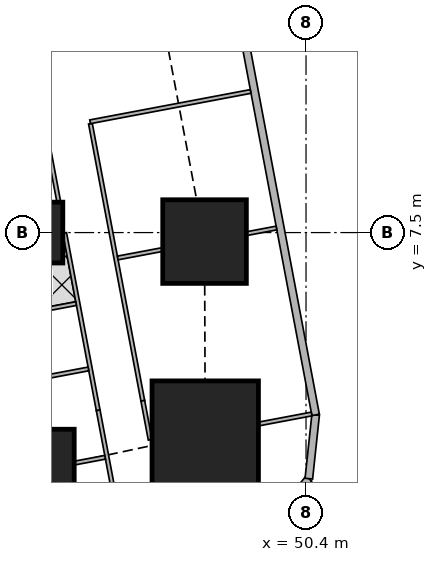
"""IFC4 building model, lengths in metres.
Left out: names, types, materials, properties, quantities, classifications, styles, units other than length and angle.
Written with IfcOpenShell. Run it as: python <this file> out.ifc"""

import sys

from ifc_helpers import new_model, si_unit, direction, frame, frame_2d, origin, origin_2d, place, context, subcontext, project, spatial, rectangle, extrude, element, fill, save


model = new_model("IFC4")
c1 = context("Model", 3, precision=1e-05, world=origin(), true_north=direction((0.0, 1.0)))
c2 = subcontext(c1, "Body", "Model", "MODEL_VIEW")
j1 = project(units=[si_unit("LENGTHUNIT", "METRE"), si_unit("PLANEANGLEUNIT", "RADIAN")], contexts=[c1])
p1 = place(None, origin())
s1 = spatial("IfcSite", under=j1, at=p1, CompositionType="ELEMENT")
p2 = place(p1, origin())
s2 = spatial("IfcBuilding", under=s1, at=p2, CompositionType="ELEMENT")
p3 = place(p2, frame((0.0, 0.0, 89.15)))
s3 = spatial("IfcBuildingStorey", under=s2, at=p3, CompositionType="ELEMENT", Elevation=89.15)
p4 = place(p3, frame((43.2, 1.225, 0.0), z_axis=(0.0, 0.0, 1.0), x_axis=(1.0, 0.0, 0.0)))
e1 = element("IfcColumn", 1, at=p4, inside=s3, PredefinedType="COLUMN", context=c2, shape_type="SweptSolid", body=[
    extrude(rectangle(XDim=2.2, YDim=2.2, at=origin_2d()), origin(), (0.0, 0.0, 1.0), 3.75),
])
p5 = place(p3, frame((47.748, 2.197, 0.0), z_axis=(0.0, 0.0, 1.0), x_axis=(1.0, 0.0, 0.0)))
e2 = element("IfcColumn", 2, at=p5, inside=s3, PredefinedType="COLUMN", context=c2, shape_type="SweptSolid", body=[
    extrude(rectangle(XDim=2.8, YDim=2.8, at=origin_2d()), origin(), (0.0, 0.0, 1.0), 3.75),
])
p6 = place(p3, frame((43.2, 7.5, 0.0), z_axis=(0.0, 0.0, 1.0), x_axis=(1.0, 0.0, 0.0)))
e3 = element("IfcColumn", 3, at=p6, inside=s3, PredefinedType="COLUMN", context=c2, shape_type="SweptSolid", body=[
    extrude(rectangle(XDim=1.6, YDim=1.6, at=origin_2d()), origin(), (0.0, 0.0, 1.0), 3.75),
])
p7 = place(p3, frame((47.73, 7.263, 0.0), z_axis=(0.0, 0.0, 1.0), x_axis=(1.0, 0.0, 0.0)))
e4 = element("IfcColumn", 4, at=p7, inside=s3, PredefinedType="COLUMN", context=c2, shape_type="SweptSolid", body=[
    extrude(rectangle(XDim=2.2, YDim=2.2, at=origin_2d()), origin(), (0.0, 0.0, 1.0), 3.75),
])
p8 = place(p3, frame((49.407, -0.263, 0.0), z_axis=(0.0, 0.0, 1.0), x_axis=(0.638042593423, 0.770001070764, 0.0)))
e5 = element("IfcWall", 5, at=p8, inside=s3, PredefinedType="SOLIDWALL", context=c2, shape_type="SweptSolid", body=[
    extrude(rectangle(XDim=1.673, YDim=0.2, at=frame_2d((0.836, 0.0))), origin(), (0.0, 0.0, 1.0), 3.5),
])
p9 = place(p3, frame((50.474, 1.025, 0.0), z_axis=(0.0, 0.0, 1.0), x_axis=(0.106047815515, 0.994361031429, 0.0)))
e6 = element("IfcWall", 6, at=p9, inside=s3, PredefinedType="SOLIDWALL", context=c2, shape_type="SweptSolid", body=[
    extrude(rectangle(XDim=1.688, YDim=0.2, at=frame_2d((0.844, 0.0))), origin(), (0.0, 0.0, 1.0), 3.5),
])
p10 = place(p3, frame((50.653, 2.703, 0.0), z_axis=(0.0, 0.0, 1.0), x_axis=(-0.185612026696, 0.982623109613, 0.0)))
e7 = element("IfcWall", 7, at=p10, inside=s3, PredefinedType="SOLIDWALL", context=c2, shape_type="SweptSolid", body=[
    extrude(rectangle(XDim=41.393, YDim=0.2, at=frame_2d((20.697, 0.0))), origin(), (0.0, 0.0, 1.0), 3.5),
])
p11 = place(p10, frame((1.633, 0.0, 0.9)))
e8 = element("IfcOpeningElement", 8, at=p11, cuts=e7, PredefinedType="OPENING", context=c2, shape_type="SweptSolid", body=[
    extrude(rectangle(XDim=1.8, YDim=1.5, at=frame_2d((0.9, 0.75))), frame((0.0, 0.11, 0.0), z_axis=(0.0, -1.0, 0.0), x_axis=(1.0, 0.0, 0.0)), (0.0, 0.0, 1.0), 0.22),
])
p12 = place(p10, frame((6.032, 0.0, 0.9)))
e9 = element("IfcOpeningElement", 9, at=p12, cuts=e7, PredefinedType="OPENING", context=c2, shape_type="SweptSolid", body=[
    extrude(rectangle(XDim=1.8, YDim=1.5, at=frame_2d((0.9, 0.75))), frame((0.0, 0.11, 0.0), z_axis=(0.0, -1.0, 0.0), x_axis=(1.0, 0.0, 0.0)), (0.0, 0.0, 1.0), 0.22),
])
p13 = place(p10, frame((9.848, 0.0, 0.9)))
e10 = element("IfcOpeningElement", 10, at=p13, cuts=e7, PredefinedType="OPENING", context=c2, shape_type="SweptSolid", body=[
    extrude(rectangle(XDim=1.8, YDim=1.5, at=frame_2d((0.9, 0.75))), frame((0.0, 0.11, 0.0), z_axis=(0.0, -1.0, 0.0), x_axis=(1.0, 0.0, 0.0)), (0.0, 0.0, 1.0), 0.22),
])
p14 = place(p10, frame((13.664, 0.0, 0.9)))
e11 = element("IfcOpeningElement", 11, at=p14, cuts=e7, PredefinedType="OPENING", context=c2, shape_type="SweptSolid", body=[
    extrude(rectangle(XDim=1.8, YDim=1.5, at=frame_2d((0.9, 0.75))), frame((0.0, 0.11, 0.0), z_axis=(0.0, -1.0, 0.0), x_axis=(1.0, 0.0, 0.0)), (0.0, 0.0, 1.0), 0.22),
])
p15 = place(p10, frame((17.481, 0.0, 0.9)))
e12 = element("IfcOpeningElement", 12, at=p15, cuts=e7, PredefinedType="OPENING", context=c2, shape_type="SweptSolid", body=[
    extrude(rectangle(XDim=1.8, YDim=1.5, at=frame_2d((0.9, 0.75))), frame((0.0, 0.11, 0.0), z_axis=(0.0, -1.0, 0.0), x_axis=(1.0, 0.0, 0.0)), (0.0, 0.0, 1.0), 0.22),
])
p16 = place(p10, frame((21.297, 0.0, 0.9)))
e13 = element("IfcOpeningElement", 13, at=p16, cuts=e7, PredefinedType="OPENING", context=c2, shape_type="SweptSolid", body=[
    extrude(rectangle(XDim=1.8, YDim=1.5, at=frame_2d((0.9, 0.75))), frame((0.0, 0.11, 0.0), z_axis=(0.0, -1.0, 0.0), x_axis=(1.0, 0.0, 0.0)), (0.0, 0.0, 1.0), 0.22),
])
p17 = place(p10, frame((25.113, 0.0, 0.9)))
e14 = element("IfcOpeningElement", 14, at=p17, cuts=e7, PredefinedType="OPENING", context=c2, shape_type="SweptSolid", body=[
    extrude(rectangle(XDim=1.8, YDim=1.5, at=frame_2d((0.9, 0.75))), frame((0.0, 0.11, 0.0), z_axis=(0.0, -1.0, 0.0), x_axis=(1.0, 0.0, 0.0)), (0.0, 0.0, 1.0), 0.22),
])
p18 = place(p10, frame((28.93, 0.0, 0.9)))
e15 = element("IfcOpeningElement", 15, at=p18, cuts=e7, PredefinedType="OPENING", context=c2, shape_type="SweptSolid", body=[
    extrude(rectangle(XDim=1.8, YDim=1.5, at=frame_2d((0.9, 0.75))), frame((0.0, 0.11, 0.0), z_axis=(0.0, -1.0, 0.0), x_axis=(1.0, 0.0, 0.0)), (0.0, 0.0, 1.0), 0.22),
])
p19 = place(p10, frame((32.746, 0.0, 0.9)))
e16 = element("IfcOpeningElement", 16, at=p19, cuts=e7, PredefinedType="OPENING", context=c2, shape_type="SweptSolid", body=[
    extrude(rectangle(XDim=1.8, YDim=1.5, at=frame_2d((0.9, 0.75))), frame((0.0, 0.11, 0.0), z_axis=(0.0, -1.0, 0.0), x_axis=(1.0, 0.0, 0.0)), (0.0, 0.0, 1.0), 0.22),
])
p20 = place(p10, frame((36.481, 0.0, 0.9)))
e17 = element("IfcOpeningElement", 17, at=p20, cuts=e7, PredefinedType="OPENING", context=c2, shape_type="SweptSolid", body=[
    extrude(rectangle(XDim=1.8, YDim=1.5, at=frame_2d((0.9, 0.75))), frame((0.0, 0.11, 0.0), z_axis=(0.0, -1.0, 0.0), x_axis=(1.0, 0.0, 0.0)), (0.0, 0.0, 1.0), 0.22),
])
p21 = place(p3, frame((44.727, 10.366, 0.0), z_axis=(0.0, 0.0, 1.0), x_axis=(0.185678775129, -0.982610498858, 0.0)))
e18 = element("IfcWall", 18, at=p21, inside=s3, PredefinedType="PARTITIONING", context=c2, shape_type="SweptSolid", body=[
    extrude(rectangle(XDim=7.421, YDim=0.1, at=frame_2d((3.71, 0.0))), origin(), (0.0, 0.0, 1.0), 3.5),
])
p22 = place(p21, frame((0.151, 0.0, 0.0)))
e19 = element("IfcOpeningElement", 19, at=p22, cuts=e18, PredefinedType="OPENING", context=c2, shape_type="SweptSolid", body=[
    extrude(rectangle(XDim=0.9, YDim=2.1, at=frame_2d((0.45, 1.05))), frame((0.0, 0.06, 0.0), z_axis=(0.0, -1.0, 0.0), x_axis=(1.0, 0.0, 0.0)), (0.0, 0.0, 1.0), 0.12),
])
p23 = place(p21, frame((4.55, 0.0, 0.0)))
e20 = element("IfcOpeningElement", 20, at=p23, cuts=e18, PredefinedType="OPENING", context=c2, shape_type="SweptSolid", body=[
    extrude(rectangle(XDim=0.9, YDim=2.1, at=frame_2d((0.45, 1.05))), frame((0.0, 0.06, 0.0), z_axis=(0.0, -1.0, 0.0), x_axis=(1.0, 0.0, 0.0)), (0.0, 0.0, 1.0), 0.12),
])
p24 = place(p3, frame((46.105, 3.074, 0.0), z_axis=(0.0, 0.0, 1.0), x_axis=(0.185897769544, -0.982569091351, 0.0)))
e21 = element("IfcWall", 21, at=p24, inside=s3, PredefinedType="PARTITIONING", context=c2, shape_type="SweptSolid", body=[
    extrude(rectangle(XDim=1.044, YDim=0.1, at=frame_2d((0.522, 0.0))), origin(), (0.0, 0.0, 1.0), 2.05),
])
p25 = place(p3, frame((43.539, 10.192, 0.0), z_axis=(0.0, 0.0, 1.0), x_axis=(0.185366049966, -0.982669541362, 0.0)))
e22 = element("IfcWall", 22, at=p25, inside=s3, PredefinedType="PARTITIONING", context=c2, shape_type="SweptSolid", body=[
    extrude(rectangle(XDim=1.915, YDim=0.1, at=frame_2d((0.958, 0.0))), origin(), (0.0, 0.0, 1.0), 3.5),
])
p26 = place(p3, frame((44.049, 7.49, 0.0), z_axis=(0.0, 0.0, 1.0), x_axis=(0.185666332607, -0.982612849975, 0.0)))
e23 = element("IfcWall", 23, at=p26, inside=s3, PredefinedType="PARTITIONING", context=c2, shape_type="SweptSolid", body=[
    extrude(rectangle(XDim=4.75, YDim=0.1, at=frame_2d((2.375, 0.0))), origin(), (0.0, 0.0, 1.0), 3.5),
])
p27 = place(p26, frame((0.8, 0.0, 0.0)))
e24 = element("IfcOpeningElement", 24, at=p27, cuts=e23, PredefinedType="OPENING", context=c2, shape_type="SweptSolid", body=[
    extrude(rectangle(XDim=0.9, YDim=2.1, at=frame_2d((0.45, 1.05))), frame((0.0, 0.06, 0.0), z_axis=(0.0, -1.0, 0.0), x_axis=(1.0, 0.0, 0.0)), (0.0, 0.0, 1.0), 0.12),
])
p28 = place(p26, frame((2.315, 0.0, 0.0)))
e25 = element("IfcOpeningElement", 25, at=p28, cuts=e23, PredefinedType="OPENING", context=c2, shape_type="SweptSolid", body=[
    extrude(rectangle(XDim=0.9, YDim=2.1, at=frame_2d((0.45, 1.05))), frame((0.0, 0.06, 0.0), z_axis=(0.0, -1.0, 0.0), x_axis=(1.0, 0.0, 0.0)), (0.0, 0.0, 1.0), 0.12),
])
p29 = place(p3, frame((44.931, 2.823, 0.0), z_axis=(0.0, 0.0, 1.0), x_axis=(0.185631845838, -0.982619365681, 0.0)))
e26 = element("IfcWall", 26, at=p29, inside=s3, PredefinedType="PARTITIONING", context=c2, shape_type="SweptSolid", body=[
    extrude(rectangle(XDim=2.403, YDim=0.1, at=frame_2d((1.201, 0.0))), origin(), (0.0, 0.0, 1.0), 2.05),
])
p30 = place(p3, frame((48.943, 11.213, 0.0), z_axis=(0.0, 0.0, 1.0), x_axis=(-0.982633535512, -0.185556823879, 0.0)))
e27 = element("IfcWall", 27, at=p30, inside=s3, PredefinedType="PARTITIONING", context=c2, shape_type="SweptSolid", body=[
    extrude(rectangle(XDim=4.3, YDim=0.1, at=frame_2d((2.15, 0.0))), origin(), (0.0, 0.0, 1.0), 2.2),
])
p31 = place(p3, frame((49.622, 7.62, 0.0), z_axis=(0.0, 0.0, 1.0), x_axis=(-0.982512656401, -0.186195810938, 0.0)))
e28 = element("IfcWall", 28, at=p31, inside=s3, PredefinedType="PARTITIONING", context=c2, shape_type="SweptSolid", body=[
    extrude(rectangle(XDim=0.796, YDim=0.1, at=frame_2d((0.398, 0.0))), origin(), (0.0, 0.0, 1.0), 2.05),
])
p32 = place(p3, frame((46.62, 7.053, 0.0), z_axis=(0.0, 0.0, 1.0), x_axis=(-0.982749355621, -0.18494243436, 0.0)))
e29 = element("IfcWall", 29, at=p32, inside=s3, PredefinedType="PARTITIONING", context=c2, shape_type="SweptSolid", body=[
    extrude(rectangle(XDim=1.195, YDim=0.1, at=frame_2d((0.597, 0.0))), origin(), (0.0, 0.0, 1.0), 2.05),
])
p33 = place(p3, frame((50.547, 2.726, 0.0), z_axis=(0.0, 0.0, 1.0), x_axis=(-0.982680053146, -0.185310315822, 0.0)))
e30 = element("IfcWall", 30, at=p33, inside=s3, PredefinedType="PARTITIONING", context=c2, shape_type="SweptSolid", body=[
    extrude(rectangle(XDim=1.414, YDim=0.1, at=frame_2d((0.707, 0.0))), origin(), (0.0, 0.0, 1.0), 3.5),
])
p34 = place(p3, frame((45.114, 1.587, 0.0), z_axis=(0.0, 0.0, 1.0), x_axis=(-0.982624706348, -0.185603573443, 0.0)))
e31 = element("IfcWall", 31, at=p34, inside=s3, PredefinedType="PARTITIONING", context=c2, shape_type="SweptSolid", body=[
    extrude(rectangle(XDim=0.818, YDim=0.1, at=frame_2d((0.409, 0.0))), origin(), (0.0, 0.0, 1.0), 2.05),
])
p35 = place(p3, frame((44.35, 5.631, 0.0), z_axis=(0.0, 0.0, 1.0), x_axis=(-0.982638553676, -0.185530247748, 0.0)))
e32 = element("IfcWall", 32, at=p35, inside=s3, PredefinedType="PARTITIONING", context=c2, shape_type="SweptSolid", body=[
    extrude(rectangle(XDim=3.525, YDim=0.1, at=frame_2d((1.763, 0.0))), origin(), (0.0, 0.0, 1.0), 3.5),
])
p36 = place(p3, frame((41.21, 3.258, 0.0), z_axis=(0.0, 0.0, 1.0), x_axis=(0.982638553676, 0.185530247748, 0.0)))
e33 = element("IfcWall", 33, at=p36, inside=s3, PredefinedType="PARTITIONING", context=c2, shape_type="SweptSolid", body=[
    extrude(rectangle(XDim=3.525, YDim=0.1, at=frame_2d((1.763, 0.0))), origin(), (0.0, 0.0, 1.0), 3.5),
])
p37 = place(p36, frame((1.65, 0.0, 0.0)))
e34 = element("IfcOpeningElement", 34, at=p37, cuts=e33, PredefinedType="OPENING", context=c2, shape_type="SweptSolid", body=[
    extrude(rectangle(XDim=0.9, YDim=2.1, at=frame_2d((0.45, 1.05))), frame((0.0, 0.06, 0.0), z_axis=(0.0, -1.0, 0.0), x_axis=(1.0, 0.0, 0.0)), (0.0, 0.0, 1.0), 0.12),
])
p38 = place(p11, origin())
e35 = element("IfcWindow", 35, at=p38, inside=s3, PartitioningType="SINGLE_PANEL", PredefinedType="WINDOW", context=c2, shape_type="SweptSolid", body=[
    extrude(rectangle(XDim=1.8, YDim=1.5, at=frame_2d((0.9, 0.75))), frame((0.0, 0.03, 0.0), z_axis=(0.0, -1.0, 0.0), x_axis=(1.0, 0.0, 0.0)), (0.0, 0.0, 1.0), 0.06),
])
fill(e8, e35)
p39 = place(p12, origin())
e36 = element("IfcWindow", 36, at=p39, inside=s3, PartitioningType="SINGLE_PANEL", PredefinedType="WINDOW", context=c2, shape_type="SweptSolid", body=[
    extrude(rectangle(XDim=1.8, YDim=1.5, at=frame_2d((0.9, 0.75))), frame((0.0, 0.03, 0.0), z_axis=(0.0, -1.0, 0.0), x_axis=(1.0, 0.0, 0.0)), (0.0, 0.0, 1.0), 0.06),
])
fill(e9, e36)
p40 = place(p22, origin())
e37 = element("IfcDoor", 37, at=p40, inside=s3, OperationType="SINGLE_SWING_LEFT", PredefinedType="DOOR", context=c2, shape_type="SweptSolid", body=[
    extrude(rectangle(XDim=0.9, YDim=2.1, at=frame_2d((0.45, 1.05))), frame((0.0, 0.025, 0.0), z_axis=(0.0, -1.0, 0.0), x_axis=(1.0, 0.0, 0.0)), (0.0, 0.0, 1.0), 0.05),
])
fill(e19, e37)
p41 = place(p23, origin())
e38 = element("IfcDoor", 38, at=p41, inside=s3, OperationType="SINGLE_SWING_LEFT", PredefinedType="DOOR", context=c2, shape_type="SweptSolid", body=[
    extrude(rectangle(XDim=0.9, YDim=2.1, at=frame_2d((0.45, 1.05))), frame((0.0, 0.025, 0.0), z_axis=(0.0, -1.0, 0.0), x_axis=(1.0, 0.0, 0.0)), (0.0, 0.0, 1.0), 0.05),
])
fill(e20, e38)
p42 = place(p27, origin())
e39 = element("IfcDoor", 39, at=p42, inside=s3, OperationType="SINGLE_SWING_LEFT", PredefinedType="DOOR", context=c2, shape_type="SweptSolid", body=[
    extrude(rectangle(XDim=0.9, YDim=2.1, at=frame_2d((0.45, 1.05))), frame((0.0, 0.025, 0.0), z_axis=(0.0, -1.0, 0.0), x_axis=(1.0, 0.0, 0.0)), (0.0, 0.0, 1.0), 0.05),
])
fill(e24, e39)
p43 = place(p28, origin())
e40 = element("IfcDoor", 40, at=p43, inside=s3, OperationType="SINGLE_SWING_LEFT", PredefinedType="DOOR", context=c2, shape_type="SweptSolid", body=[
    extrude(rectangle(XDim=0.9, YDim=2.1, at=frame_2d((0.45, 1.05))), frame((0.0, 0.025, 0.0), z_axis=(0.0, -1.0, 0.0), x_axis=(1.0, 0.0, 0.0)), (0.0, 0.0, 1.0), 0.05),
])
fill(e25, e40)
p44 = place(p37, origin())
e41 = element("IfcDoor", 41, at=p44, inside=s3, OperationType="SINGLE_SWING_RIGHT", PredefinedType="DOOR", context=c2, shape_type="SweptSolid", body=[
    extrude(rectangle(XDim=0.9, YDim=2.1, at=frame_2d((0.45, 1.05))), frame((0.0, 0.025, 0.0), z_axis=(0.0, -1.0, 0.0), x_axis=(1.0, 0.0, 0.0)), (0.0, 0.0, 1.0), 0.05),
])
fill(e34, e41)
save(model, sys.argv[1])
